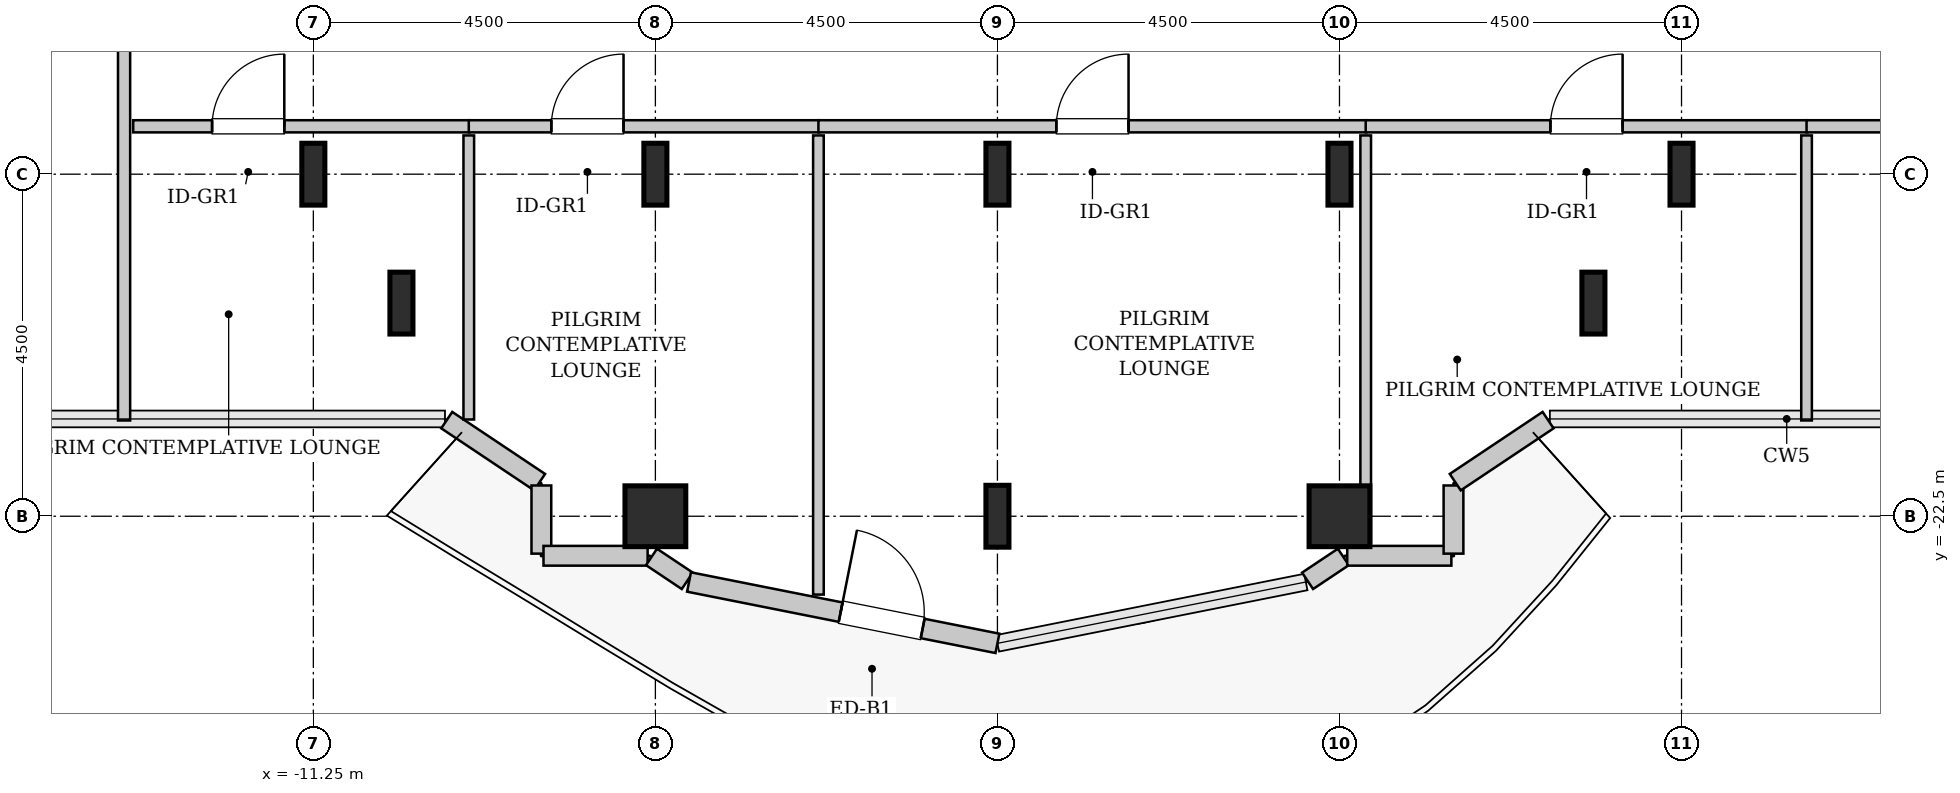
"""IFC4 building model, lengths in metres.
Left out: names, types, materials, properties, quantities, classifications, styles, units other than length and angle.
Written with IfcOpenShell. Run it as: python <this file> out.ifc"""

import sys

from ifc_helpers import new_model, si_unit, direction, frame, frame_2d, origin, origin_2d, place, context, subcontext, project, spatial, rectangle, hollow_rectangle, i_section, extrude, source, transform, mapped, element, fill, save


model = new_model("IFC4")
c1 = context("Model", 3, precision=1e-05, world=origin(), true_north=direction((0.0, 1.0)))
c2 = subcontext(c1, "Body", "Model", "MODEL_VIEW")
j1 = project(units=[si_unit("LENGTHUNIT", "METRE"), si_unit("PLANEANGLEUNIT", "RADIAN")], contexts=[c1])
p1 = place(None, origin())
s1 = spatial("IfcSite", under=j1, at=p1, CompositionType="ELEMENT")
p2 = place(p1, origin())
s2 = spatial("IfcBuilding", under=s1, at=p2, CompositionType="ELEMENT")
p3 = place(p2, frame((0.0, 0.0, 148.8)))
s3 = spatial("IfcBuildingStorey", under=s2, at=p3, CompositionType="ELEMENT", Elevation=148.8)
m1 = source(origin(), c2, "Body", "SweptSolid", [
    extrude(i_section(OverallWidth=0.303, OverallDepth=0.814, WebThickness=0.021, FlangeThickness=0.04, FilletRadius=0.03, at=origin_2d()), origin(), (0.0, 0.0, 1.0), 3.8),
])
for number, where, z_axis, x_axis in (
    (1, (-11.25, -18.0, 0.0), (0.0, 0.0, 1.0), (1.0, 0.0, 0.0)),
    (2, (-10.091, -19.696, 0.0), (0.0, 0.0, 1.0), (1.0, 0.0, 0.0)),
):
    element("IfcColumn", number, at=place(p3, frame(where, z_axis=z_axis, x_axis=x_axis)), inside=s3, PredefinedType="COLUMN", context=c2, shape_type="MappedRepresentation", body=[
        mapped(m1, transform((0.0, 0.0, 0.0), x_axis=(1.0, 0.0, 0.0), y_axis=(0.0, 1.0, 0.0), z_axis=(0.0, 0.0, 1.0), scale=1.0)),
    ])
m2 = source(origin(), c2, "Body", "SweptSolid", [
    extrude(hollow_rectangle(XDim=0.8, YDim=0.8, WallThickness=0.04, InnerFilletRadius=0.04, OuterFilletRadius=0.08, at=origin_2d()), origin(), (0.0, 0.0, 1.0), 3.8),
])
p4 = place(p3, frame((-6.75, -22.5, 0.0), z_axis=(0.0, 0.0, 1.0), x_axis=(1.0, 0.0, 0.0)))
e3 = element("IfcColumn", 3, at=p4, inside=s3, PredefinedType="COLUMN", context=c2, shape_type="MappedRepresentation", body=[
    mapped(m2, transform((0.0, 0.0, 0.0), x_axis=(1.0, 0.0, 0.0), y_axis=(0.0, 1.0, 0.0), z_axis=(0.0, 0.0, 1.0), scale=1.0)),
])
for number, where, z_axis, x_axis in (
    (4, (-6.75, -18.0, 0.0), (0.0, 0.0, 1.0), (1.0, 0.0, 0.0)),
    (5, (-2.25, -22.5, 0.0), (0.0, 0.0, 1.0), (1.0, 0.0, 0.0)),
    (6, (-2.25, -18.0, 0.0), (0.0, 0.0, 1.0), (1.0, 0.0, 0.0)),
):
    element("IfcColumn", number, at=place(p3, frame(where, z_axis=z_axis, x_axis=x_axis)), inside=s3, PredefinedType="COLUMN", context=c2, shape_type="MappedRepresentation", body=[
        mapped(m1, transform((0.0, 0.0, 0.0), x_axis=(1.0, 0.0, 0.0), y_axis=(0.0, 1.0, 0.0), z_axis=(0.0, 0.0, 1.0), scale=1.0)),
    ])
p5 = place(p3, frame((2.25, -22.5, 0.0), z_axis=(0.0, 0.0, 1.0), x_axis=(1.0, 0.0, 0.0)))
e7 = element("IfcColumn", 7, at=p5, inside=s3, PredefinedType="COLUMN", context=c2, shape_type="MappedRepresentation", body=[
    mapped(m2, transform((0.0, 0.0, 0.0), x_axis=(1.0, 0.0, 0.0), y_axis=(0.0, 1.0, 0.0), z_axis=(0.0, 0.0, 1.0), scale=1.0)),
])
for number, where, z_axis, x_axis in (
    (8, (2.25, -18.0, 0.0), (0.0, 0.0, 1.0), (1.0, 0.0, 0.0)),
    (9, (5.591, -19.696, 0.0), (0.0, 0.0, 1.0), (1.0, 0.0, 0.0)),
    (10, (6.75, -18.0, 0.0), (0.0, 0.0, 1.0), (1.0, 0.0, 0.0)),
):
    element("IfcColumn", number, at=place(p3, frame(where, z_axis=z_axis, x_axis=x_axis)), inside=s3, PredefinedType="COLUMN", context=c2, shape_type="MappedRepresentation", body=[
        mapped(m1, transform((0.0, 0.0, 0.0), x_axis=(1.0, 0.0, 0.0), y_axis=(0.0, 1.0, 0.0), z_axis=(0.0, 0.0, 1.0), scale=1.0)),
    ])
m3 = source(origin(), c2, "Body", "SweptSolid", [
    extrude(rectangle(XDim=1.469, YDim=0.26, at=frame_2d((0.734, 0.0))), origin(), (0.0, 0.0, 1.0), 3.55),
])
p6 = place(p3, frame((-9.495, -21.236, 0.0), z_axis=(0.0, 0.0, 1.0), x_axis=(0.831461760506, -0.555581983884, 0.0)))
e11 = element("IfcWall", 11, at=p6, inside=s3, PredefinedType="SOLIDWALL", context=c2, shape_type="MappedRepresentation", body=[
    mapped(m3, transform((0.0, 0.0, 0.0), x_axis=(1.0, 0.0, 0.0), y_axis=(0.0, 1.0, 0.0), z_axis=(0.0, 0.0, 1.0), scale=1.0)),
])
m4 = source(origin(), c2, "Body", "SweptSolid", [
    extrude(rectangle(XDim=0.897, YDim=0.26, at=frame_2d((0.448, 0.0))), origin(), (0.0, 0.0, 1.0), 3.55),
])
p7 = place(p3, frame((-8.25, -22.095, 0.0), z_axis=(0.0, 0.0, 1.0), x_axis=(0.0, -1.0, 0.0)))
e12 = element("IfcWall", 12, at=p7, inside=s3, PredefinedType="SOLIDWALL", context=c2, shape_type="MappedRepresentation", body=[
    mapped(m4, transform((0.0, 0.0, 0.0), x_axis=(1.0, 0.0, 0.0), y_axis=(0.0, 1.0, 0.0), z_axis=(0.0, 0.0, 1.0), scale=1.0)),
])
m5 = source(origin(), c2, "Body", "SweptSolid", [
    extrude(rectangle(XDim=1.37, YDim=0.26, at=frame_2d((0.685, 0.0))), origin(), (0.0, 0.0, 1.0), 3.55),
])
p8 = place(p3, frame((-8.222, -23.02, 0.0), z_axis=(0.0, 0.0, 1.0), x_axis=(1.0, 0.0, 0.0)))
e13 = element("IfcWall", 13, at=p8, inside=s3, PredefinedType="SOLIDWALL", context=c2, shape_type="MappedRepresentation", body=[
    mapped(m5, transform((0.0, 0.0, 0.0), x_axis=(1.0, 0.0, 0.0), y_axis=(0.0, 1.0, 0.0), z_axis=(0.0, 0.0, 1.0), scale=1.0)),
])
m6 = source(origin(), c2, "Body", "SweptSolid", [
    extrude(rectangle(XDim=0.565, YDim=0.26, at=frame_2d((0.283, 0.0))), origin(), (0.0, 0.0, 1.0), 3.55),
])
p9 = place(p3, frame((-6.801, -23.036, 0.0), z_axis=(0.0, 0.0, 1.0), x_axis=(0.831651492666, -0.555297933317, 0.0)))
e14 = element("IfcWall", 14, at=p9, inside=s3, PredefinedType="SOLIDWALL", context=c2, shape_type="MappedRepresentation", body=[
    mapped(m6, transform((0.0, 0.0, 0.0), x_axis=(1.0, 0.0, 0.0), y_axis=(0.0, 1.0, 0.0), z_axis=(0.0, 0.0, 1.0), scale=1.0)),
])
m7 = source(origin(), c2, "Body", "SweptSolid", [
    extrude(rectangle(XDim=4.137, YDim=0.26, at=frame_2d((2.068, 0.0))), origin(), (0.0, 0.0, 1.0), 3.55),
])
p10 = place(p3, frame((-6.307, -23.365, 0.0), z_axis=(0.0, 0.0, 1.0), x_axis=(0.980782170794, -0.195105954428, 0.0)))
e15 = element("IfcWall", 15, at=p10, inside=s3, PredefinedType="SOLIDWALL", context=c2, shape_type="MappedRepresentation", body=[
    mapped(m7, transform((0.0, 0.0, 0.0), x_axis=(1.0, 0.0, 0.0), y_axis=(0.0, 1.0, 0.0), z_axis=(0.0, 0.0, 1.0), scale=1.0)),
])
p11 = place(p10, frame((2.034, 0.0, 0.0)))
e16 = element("IfcOpeningElement", 16, at=p11, cuts=e15, PredefinedType="OPENING", context=c2, shape_type="SweptSolid", body=[
    extrude(rectangle(XDim=1.1, YDim=2.2, at=frame_2d((0.55, 1.1))), frame((0.0, 0.14, 0.0), z_axis=(0.0, -1.0, 0.0), x_axis=(1.0, 0.0, 0.0)), (0.0, 0.0, 1.0), 0.28),
])
p12 = place(p3, frame((1.831, -23.35, 0.0), z_axis=(0.0, 0.0, 1.0), x_axis=(0.831651492666, 0.555297933317, 0.0)))
e17 = element("IfcWall", 17, at=p12, inside=s3, PredefinedType="SOLIDWALL", context=c2, shape_type="MappedRepresentation", body=[
    mapped(m6, transform((0.0, 0.0, 0.0), x_axis=(1.0, 0.0, 0.0), y_axis=(0.0, 1.0, 0.0), z_axis=(0.0, 0.0, 1.0), scale=1.0)),
])
p13 = place(p3, frame((2.352, -23.02, 0.0), z_axis=(0.0, 0.0, 1.0), x_axis=(1.0, 0.0, 0.0)))
e18 = element("IfcWall", 18, at=p13, inside=s3, PredefinedType="SOLIDWALL", context=c2, shape_type="MappedRepresentation", body=[
    mapped(m5, transform((0.0, 0.0, 0.0), x_axis=(1.0, 0.0, 0.0), y_axis=(0.0, 1.0, 0.0), z_axis=(0.0, 0.0, 1.0), scale=1.0)),
])
p14 = place(p3, frame((3.75, -22.992, 0.0), z_axis=(0.0, 0.0, 1.0), x_axis=(0.0, 1.0, 0.0)))
e19 = element("IfcWall", 19, at=p14, inside=s3, PredefinedType="SOLIDWALL", context=c2, shape_type="MappedRepresentation", body=[
    mapped(m4, transform((0.0, 0.0, 0.0), x_axis=(1.0, 0.0, 0.0), y_axis=(0.0, 1.0, 0.0), z_axis=(0.0, 0.0, 1.0), scale=1.0)),
])
p15 = place(p3, frame((3.773, -22.052, 0.0), z_axis=(0.0, 0.0, 1.0), x_axis=(0.831461760506, 0.555581983884, 0.0)))
e20 = element("IfcWall", 20, at=p15, inside=s3, PredefinedType="SOLIDWALL", context=c2, shape_type="MappedRepresentation", body=[
    mapped(m3, transform((0.0, 0.0, 0.0), x_axis=(1.0, 0.0, 0.0), y_axis=(0.0, 1.0, 0.0), z_axis=(0.0, 0.0, 1.0), scale=1.0)),
])
m8 = source(origin(), c2, "Body", "SweptSolid", [
    extrude(rectangle(XDim=13.045, YDim=0.16, at=frame_2d((6.522, 0.0))), origin(), (0.0, 0.0, 1.0), 3.535),
])
p16 = place(p3, frame((-13.74, -21.24, 0.0), z_axis=(0.0, 0.0, 1.0), x_axis=(0.0, 1.0, 0.0)))
e21 = element("IfcWall", 21, at=p16, inside=s3, PredefinedType="PARTITIONING", context=c2, shape_type="MappedRepresentation", body=[
    mapped(m8, transform((0.0, 0.0, 0.0), x_axis=(1.0, 0.0, 0.0), y_axis=(0.0, 1.0, 0.0), z_axis=(0.0, 0.0, 1.0), scale=1.0)),
])
p17 = place(p16, frame((7.962, 0.0, 0.0)))
e22 = element("IfcOpeningElement", 22, at=p17, cuts=e21, PredefinedType="OPENING", context=c2, shape_type="SweptSolid", body=[
    extrude(rectangle(XDim=0.95, YDim=2.1, at=frame_2d((0.475, 1.05))), frame((0.0, 0.09, 0.0), z_axis=(0.0, -1.0, 0.0), x_axis=(1.0, 0.0, 0.0)), (0.0, 0.0, 1.0), 0.18),
])
m9 = source(origin(), c2, "Body", "SweptSolid", [
    extrude(rectangle(XDim=4.425, YDim=0.16, at=frame_2d((2.212, 0.0))), origin(), (0.0, 0.0, 1.0), 3.535),
])
p18 = place(p3, frame((-13.62, -17.37, 0.0), z_axis=(0.0, 0.0, 1.0), x_axis=(1.0, 0.0, 0.0)))
e23 = element("IfcWall", 23, at=p18, inside=s3, PredefinedType="PARTITIONING", context=c2, shape_type="MappedRepresentation", body=[
    mapped(m9, transform((0.0, 0.0, 0.0), x_axis=(1.0, 0.0, 0.0), y_axis=(0.0, 1.0, 0.0), z_axis=(0.0, 0.0, 1.0), scale=1.0)),
])
p19 = place(p18, frame((1.038, 0.0, 0.0)))
e24 = element("IfcOpeningElement", 24, at=p19, cuts=e23, PredefinedType="OPENING", context=c2, shape_type="SweptSolid", body=[
    extrude(rectangle(XDim=0.95, YDim=2.1, at=frame_2d((0.475, 1.05))), frame((0.0, 0.09, 0.0), z_axis=(0.0, -1.0, 0.0), x_axis=(1.0, 0.0, 0.0)), (0.0, 0.0, 1.0), 0.18),
])
m10 = source(origin(), c2, "Body", "SweptSolid", [
    extrude(rectangle(XDim=3.737, YDim=0.14, at=frame_2d((1.869, 0.0))), origin(), (0.0, 0.0, 1.0), 3.535),
])
p20 = place(p3, frame((-9.205, -21.227, 0.0), z_axis=(0.0, 0.0, 1.0), x_axis=(0.0, 1.0, 0.0)))
e25 = element("IfcWall", 25, at=p20, inside=s3, PredefinedType="PARTITIONING", context=c2, shape_type="MappedRepresentation", body=[
    mapped(m10, transform((0.0, 0.0, 0.0), x_axis=(1.0, 0.0, 0.0), y_axis=(0.0, 1.0, 0.0), z_axis=(0.0, 0.0, 1.0), scale=1.0)),
])
m11 = source(origin(), c2, "Body", "SweptSolid", [
    extrude(rectangle(XDim=4.61, YDim=0.16, at=frame_2d((2.305, 0.0))), origin(), (0.0, 0.0, 1.0), 3.535),
])
p21 = place(p3, frame((-9.205, -17.37, 0.0), z_axis=(0.0, 0.0, 1.0), x_axis=(1.0, 0.0, 0.0)))
e26 = element("IfcWall", 26, at=p21, inside=s3, PredefinedType="PARTITIONING", context=c2, shape_type="MappedRepresentation", body=[
    mapped(m11, transform((0.0, 0.0, 0.0), x_axis=(1.0, 0.0, 0.0), y_axis=(0.0, 1.0, 0.0), z_axis=(0.0, 0.0, 1.0), scale=1.0)),
])
p22 = place(p21, frame((1.086, 0.0, 0.0)))
e27 = element("IfcOpeningElement", 27, at=p22, cuts=e26, PredefinedType="OPENING", context=c2, shape_type="SweptSolid", body=[
    extrude(rectangle(XDim=0.95, YDim=2.1, at=frame_2d((0.475, 1.05))), frame((0.0, 0.09, 0.0), z_axis=(0.0, -1.0, 0.0), x_axis=(1.0, 0.0, 0.0)), (0.0, 0.0, 1.0), 0.18),
])
m12 = source(origin(), c2, "Body", "SweptSolid", [
    extrude(rectangle(XDim=6.041, YDim=0.14, at=frame_2d((3.021, 0.0))), origin(), (0.0, 0.0, 1.0), 3.535),
])
p23 = place(p3, frame((-4.605, -23.531, 0.0), z_axis=(0.0, 0.0, 1.0), x_axis=(0.0, 1.0, 0.0)))
e28 = element("IfcWall", 28, at=p23, inside=s3, PredefinedType="PARTITIONING", context=c2, shape_type="MappedRepresentation", body=[
    mapped(m12, transform((0.0, 0.0, 0.0), x_axis=(1.0, 0.0, 0.0), y_axis=(0.0, 1.0, 0.0), z_axis=(0.0, 0.0, 1.0), scale=1.0)),
])
m13 = source(origin(), c2, "Body", "SweptSolid", [
    extrude(rectangle(XDim=7.21, YDim=0.16, at=frame_2d((3.605, 0.0))), origin(), (0.0, 0.0, 1.0), 3.535),
])
p24 = place(p3, frame((-4.605, -17.37, 0.0), z_axis=(0.0, 0.0, 1.0), x_axis=(1.0, 0.0, 0.0)))
e29 = element("IfcWall", 29, at=p24, inside=s3, PredefinedType="PARTITIONING", context=c2, shape_type="MappedRepresentation", body=[
    mapped(m13, transform((0.0, 0.0, 0.0), x_axis=(1.0, 0.0, 0.0), y_axis=(0.0, 1.0, 0.0), z_axis=(0.0, 0.0, 1.0), scale=1.0)),
])
p25 = place(p24, frame((3.13, 0.0, 0.0)))
e30 = element("IfcOpeningElement", 30, at=p25, cuts=e29, PredefinedType="OPENING", context=c2, shape_type="SweptSolid", body=[
    extrude(rectangle(XDim=0.95, YDim=2.1, at=frame_2d((0.475, 1.05))), frame((0.0, 0.09, 0.0), z_axis=(0.0, -1.0, 0.0), x_axis=(1.0, 0.0, 0.0)), (0.0, 0.0, 1.0), 0.18),
])
m14 = source(origin(), c2, "Body", "SweptSolid", [
    extrude(rectangle(XDim=5.36, YDim=0.14, at=frame_2d((2.68, 0.0))), origin(), (0.0, 0.0, 1.0), 2.875),
])
p26 = place(p3, frame((2.595, -22.85, 0.0), z_axis=(0.0, 0.0, 1.0), x_axis=(0.0, 1.0, 0.0)))
e31 = element("IfcWall", 31, at=p26, inside=s3, PredefinedType="PARTITIONING", context=c2, shape_type="MappedRepresentation", body=[
    mapped(m14, transform((0.0, 0.0, 0.0), x_axis=(1.0, 0.0, 0.0), y_axis=(0.0, 1.0, 0.0), z_axis=(0.0, 0.0, 1.0), scale=1.0)),
])
m15 = source(origin(), c2, "Body", "SweptSolid", [
    extrude(rectangle(XDim=5.81, YDim=0.16, at=frame_2d((2.905, 0.0))), origin(), (0.0, 0.0, 1.0), 3.535),
])
p27 = place(p3, frame((2.595, -17.37, 0.0), z_axis=(0.0, 0.0, 1.0), x_axis=(1.0, 0.0, 0.0)))
e32 = element("IfcWall", 32, at=p27, inside=s3, PredefinedType="PARTITIONING", context=c2, shape_type="MappedRepresentation", body=[
    mapped(m15, transform((0.0, 0.0, 0.0), x_axis=(1.0, 0.0, 0.0), y_axis=(0.0, 1.0, 0.0), z_axis=(0.0, 0.0, 1.0), scale=1.0)),
])
p28 = place(p27, frame((2.43, 0.0, 0.0)))
e33 = element("IfcOpeningElement", 33, at=p28, cuts=e32, PredefinedType="OPENING", context=c2, shape_type="SweptSolid", body=[
    extrude(rectangle(XDim=0.95, YDim=2.1, at=frame_2d((0.475, 1.05))), frame((0.0, 0.09, 0.0), z_axis=(0.0, -1.0, 0.0), x_axis=(1.0, 0.0, 0.0)), (0.0, 0.0, 1.0), 0.18),
])
m16 = source(origin(), c2, "Body", "SweptSolid", [
    extrude(rectangle(XDim=3.75, YDim=0.14, at=frame_2d((1.875, 0.0))), origin(), (0.0, 0.0, 1.0), 3.535),
])
p29 = place(p3, frame((8.395, -21.24, 0.0), z_axis=(0.0, 0.0, 1.0), x_axis=(0.0, 1.0, 0.0)))
e34 = element("IfcWall", 34, at=p29, inside=s3, PredefinedType="PARTITIONING", context=c2, shape_type="MappedRepresentation", body=[
    mapped(m16, transform((0.0, 0.0, 0.0), x_axis=(1.0, 0.0, 0.0), y_axis=(0.0, 1.0, 0.0), z_axis=(0.0, 0.0, 1.0), scale=1.0)),
])
m17 = source(origin(), c2, "Body", "SweptSolid", [
    extrude(rectangle(XDim=5.225, YDim=0.16, at=frame_2d((2.613, 0.0))), origin(), (0.0, 0.0, 1.0), 3.535),
])
p30 = place(p3, frame((8.395, -17.37, 0.0), z_axis=(0.0, 0.0, 1.0), x_axis=(1.0, 0.0, 0.0)))
e35 = element("IfcWall", 35, at=p30, inside=s3, PredefinedType="PARTITIONING", context=c2, shape_type="MappedRepresentation", body=[
    mapped(m17, transform((0.0, 0.0, 0.0), x_axis=(1.0, 0.0, 0.0), y_axis=(0.0, 1.0, 0.0), z_axis=(0.0, 0.0, 1.0), scale=1.0)),
])
p31 = place(p30, frame((1.543, 0.0, 0.0)))
e36 = element("IfcOpeningElement", 36, at=p31, cuts=e35, PredefinedType="OPENING", context=c2, shape_type="SweptSolid", body=[
    extrude(rectangle(XDim=0.95, YDim=2.1, at=frame_2d((0.475, 1.05))), frame((0.0, 0.09, 0.0), z_axis=(0.0, -1.0, 0.0), x_axis=(1.0, 0.0, 0.0)), (0.0, 0.0, 1.0), 0.18),
])
m18 = source(origin(), c2, "Body", "SweptSolid", [
    extrude(rectangle(XDim=1.1, YDim=2.2, at=frame_2d((0.55, 1.1))), frame((0.0, 0.025, 0.0), z_axis=(0.0, -1.0, 0.0), x_axis=(1.0, 0.0, 0.0)), (0.0, 0.0, 1.0), 0.05),
])
p32 = place(p11, origin())
e37 = element("IfcDoor", 37, at=p32, inside=s3, OperationType="SINGLE_SWING_LEFT", PredefinedType="DOOR", context=c2, shape_type="MappedRepresentation", body=[
    mapped(m18, transform((0.0, 0.0, 0.0), x_axis=(1.0, 0.0, 0.0), y_axis=(0.0, 1.0, 0.0), z_axis=(0.0, 0.0, 1.0), scale=1.0)),
])
fill(e16, e37)
m19 = source(origin(), c2, "Body", "SweptSolid", [
    extrude(rectangle(XDim=0.95, YDim=2.1, at=frame_2d((0.475, 1.05))), frame((0.0, 0.025, 0.0), z_axis=(0.0, -1.0, 0.0), x_axis=(1.0, 0.0, 0.0)), (0.0, 0.0, 1.0), 0.05),
])
p33 = place(p19, origin())
e38 = element("IfcDoor", 38, at=p33, inside=s3, OperationType="SINGLE_SWING_RIGHT", PredefinedType="DOOR", context=c2, shape_type="MappedRepresentation", body=[
    mapped(m19, transform((0.0, 0.0, 0.0), x_axis=(1.0, 0.0, 0.0), y_axis=(0.0, 1.0, 0.0), z_axis=(0.0, 0.0, 1.0), scale=1.0)),
])
fill(e24, e38)
p34 = place(p22, origin())
e39 = element("IfcDoor", 39, at=p34, inside=s3, OperationType="SINGLE_SWING_RIGHT", PredefinedType="DOOR", context=c2, shape_type="MappedRepresentation", body=[
    mapped(m19, transform((0.0, 0.0, 0.0), x_axis=(1.0, 0.0, 0.0), y_axis=(0.0, 1.0, 0.0), z_axis=(0.0, 0.0, 1.0), scale=1.0)),
])
fill(e27, e39)
p35 = place(p25, origin())
e40 = element("IfcDoor", 40, at=p35, inside=s3, OperationType="SINGLE_SWING_RIGHT", PredefinedType="DOOR", context=c2, shape_type="MappedRepresentation", body=[
    mapped(m19, transform((0.0, 0.0, 0.0), x_axis=(1.0, 0.0, 0.0), y_axis=(0.0, 1.0, 0.0), z_axis=(0.0, 0.0, 1.0), scale=1.0)),
])
fill(e30, e40)
p36 = place(p28, origin())
e41 = element("IfcDoor", 41, at=p36, inside=s3, OperationType="SINGLE_SWING_RIGHT", PredefinedType="DOOR", context=c2, shape_type="MappedRepresentation", body=[
    mapped(m19, transform((0.0, 0.0, 0.0), x_axis=(1.0, 0.0, 0.0), y_axis=(0.0, 1.0, 0.0), z_axis=(0.0, 0.0, 1.0), scale=1.0)),
])
fill(e33, e41)
save(model, sys.argv[1])
